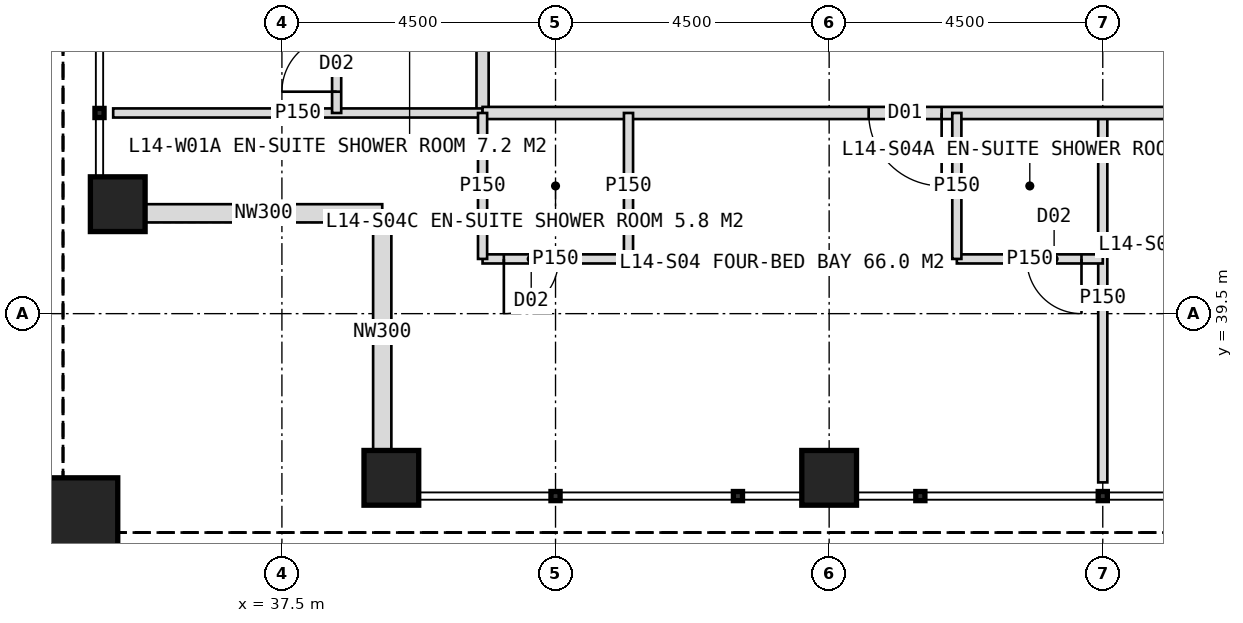
"""IFC4 building model, lengths in metres.
Left out: names, types, materials, properties, quantities, classifications, styles, units other than length and angle.
Written with IfcOpenShell. Run it as: python <this file> out.ifc"""

import sys

from ifc_helpers import new_model, si_unit, direction, frame, frame_2d, origin, origin_2d, place, context, subcontext, project, spatial, rectangle, hollow_rectangle, extrude, element, fill, save


model = new_model("IFC4")
c1 = context("Model", 3, precision=1e-05, world=origin(), true_north=direction((0.0, 1.0)))
c2 = subcontext(c1, "Body", "Model", "MODEL_VIEW")
j1 = project(units=[si_unit("LENGTHUNIT", "METRE"), si_unit("PLANEANGLEUNIT", "RADIAN")], contexts=[c1])
p1 = place(None, origin())
s1 = spatial("IfcSite", under=j1, at=p1, CompositionType="ELEMENT")
p2 = place(p1, origin())
s2 = spatial("IfcBuilding", under=s1, at=p2, CompositionType="ELEMENT")
p3 = place(p2, frame((0.0, 0.0, 63.0)))
s3 = spatial("IfcBuildingStorey", under=s2, at=p3, CompositionType="ELEMENT", Elevation=63.0)
for number, where, z_axis, x_axis in (
    (1, (39.3, 36.8, 0.0), (0.0, 0.0, 1.0), (1.0, 0.0, 0.0)),
    (2, (34.8, 41.3, 0.0), (0.0, 0.0, 1.0), (1.0, 0.0, 0.0)),
    (3, (46.5, 36.8, 0.0), (0.0, 0.0, 1.0), (1.0, 0.0, 0.0)),
):
    element("IfcColumn", number, at=place(p3, frame(where, z_axis=z_axis, x_axis=x_axis)), inside=s3, PredefinedType="COLUMN", context=c2, shape_type="SweptSolid", body=[
        extrude(hollow_rectangle(XDim=0.9, YDim=0.9, WallThickness=0.08, at=origin_2d()), origin(), (0.0, 0.0, 1.0), 4.0),
    ])
p4 = place(p3, frame((33.9, 35.9, 0.0), z_axis=(0.0, 0.0, 1.0), x_axis=(1.0, 0.0, 0.0)))
e4 = element("IfcColumn", 4, at=p4, inside=s3, PredefinedType="COLUMN", context=c2, shape_type="SweptSolid", body=[
    extrude(hollow_rectangle(XDim=1.8, YDim=1.8, WallThickness=0.1, at=origin_2d()), origin(), (0.0, 0.0, 1.0), 4.0),
])
for number, where, z_axis, x_axis in (
    (5, (39.15, 37.25, 0.0), (0.0, 0.0, 1.0), (0.0, 1.0, 0.0)),
    (6, (39.15, 41.15, 0.0), (0.0, 0.0, 1.0), (-1.0, 0.0, 0.0)),
):
    element("IfcWall", number, at=place(p3, frame(where, z_axis=z_axis, x_axis=x_axis)), inside=s3, PredefinedType="ELEMENTEDWALL", context=c2, shape_type="SweptSolid", body=[
        extrude(rectangle(XDim=3.9, YDim=0.3, at=frame_2d((1.95, 0.0))), origin(), (0.0, 0.0, 1.0), 2.95),
    ])
p5 = place(p3, frame((40.8, 42.8, 0.0), z_axis=(0.0, 0.0, 1.0), x_axis=(0.0, 1.0, 0.0)))
e7 = element("IfcWall", 7, at=p5, inside=s3, PredefinedType="PARTITIONING", context=c2, shape_type="SweptSolid", body=[
    extrude(rectangle(XDim=38.4, YDim=0.2, at=frame_2d((19.2, 0.0))), origin(), (0.0, 0.0, 1.0), 3.75),
])
p6 = place(p5, frame((3.25, 0.0, 0.0)))
e8 = element("IfcOpeningElement", 8, at=p6, cuts=e7, PredefinedType="OPENING", context=c2, shape_type="SweptSolid", body=[
    extrude(rectangle(XDim=1.2, YDim=2.2, at=frame_2d((0.6, 1.1))), frame((0.0, 0.11, 0.0), z_axis=(0.0, -1.0, 0.0), x_axis=(1.0, 0.0, 0.0)), (0.0, 0.0, 1.0), 0.22),
])
p7 = place(p5, frame((9.85, 0.0, 0.0)))
e9 = element("IfcOpeningElement", 9, at=p7, cuts=e7, PredefinedType="OPENING", context=c2, shape_type="SweptSolid", body=[
    extrude(rectangle(XDim=1.2, YDim=2.2, at=frame_2d((0.6, 1.1))), frame((0.0, 0.11, 0.0), z_axis=(0.0, -1.0, 0.0), x_axis=(1.0, 0.0, 0.0)), (0.0, 0.0, 1.0), 0.22),
])
p8 = place(p5, frame((15.85, 0.0, 0.0)))
e10 = element("IfcOpeningElement", 10, at=p8, cuts=e7, PredefinedType="OPENING", context=c2, shape_type="SweptSolid", body=[
    extrude(rectangle(XDim=1.2, YDim=2.2, at=frame_2d((0.6, 1.1))), frame((0.0, 0.11, 0.0), z_axis=(0.0, -1.0, 0.0), x_axis=(1.0, 0.0, 0.0)), (0.0, 0.0, 1.0), 0.22),
])
p9 = place(p5, frame((22.45, 0.0, 0.0)))
e11 = element("IfcOpeningElement", 11, at=p9, cuts=e7, PredefinedType="OPENING", context=c2, shape_type="SweptSolid", body=[
    extrude(rectangle(XDim=1.2, YDim=2.2, at=frame_2d((0.6, 1.1))), frame((0.0, 0.11, 0.0), z_axis=(0.0, -1.0, 0.0), x_axis=(1.0, 0.0, 0.0)), (0.0, 0.0, 1.0), 0.22),
])
p10 = place(p5, frame((30.85, 0.0, 0.0)))
e12 = element("IfcOpeningElement", 12, at=p10, cuts=e7, PredefinedType="OPENING", context=c2, shape_type="SweptSolid", body=[
    extrude(rectangle(XDim=1.2, YDim=2.2, at=frame_2d((0.6, 1.1))), frame((0.0, 0.11, 0.0), z_axis=(0.0, -1.0, 0.0), x_axis=(1.0, 0.0, 0.0)), (0.0, 0.0, 1.0), 0.22),
])
p11 = place(p3, frame((40.8, 42.8, 0.0), z_axis=(0.0, 0.0, 1.0), x_axis=(-1.0, 0.0, 0.0)))
e13 = element("IfcWall", 13, at=p11, inside=s3, PredefinedType="PARTITIONING", context=c2, shape_type="SweptSolid", body=[
    extrude(rectangle(XDim=6.075, YDim=0.15, at=frame_2d((3.038, 0.0))), origin(), (0.0, 0.0, 1.0), 3.75),
])
p12 = place(p3, frame((38.4, 42.8, 0.0), z_axis=(0.0, 0.0, 1.0), x_axis=(0.0, 1.0, 0.0)))
e14 = element("IfcWall", 14, at=p12, inside=s3, PredefinedType="PARTITIONING", context=c2, shape_type="SweptSolid", body=[
    extrude(rectangle(XDim=3.0, YDim=0.15, at=frame_2d((1.5, 0.0))), origin(), (0.0, 0.0, 1.0), 3.75),
])
p13 = place(p12, frame((0.35, 0.0, 0.0)))
e15 = element("IfcOpeningElement", 15, at=p13, cuts=e14, PredefinedType="OPENING", context=c2, shape_type="SweptSolid", body=[
    extrude(rectangle(XDim=0.9, YDim=2.1, at=frame_2d((0.45, 1.05))), frame((0.0, 0.085, 0.0), z_axis=(0.0, -1.0, 0.0), x_axis=(1.0, 0.0, 0.0)), (0.0, 0.0, 1.0), 0.17),
])
p14 = place(p3, frame((51.0, 42.8, 0.0), z_axis=(0.0, 0.0, 1.0), x_axis=(0.0, -1.0, 0.0)))
e16 = element("IfcWall", 16, at=p14, inside=s3, PredefinedType="PARTITIONING", context=c2, shape_type="SweptSolid", body=[
    extrude(rectangle(XDim=6.075, YDim=0.15, at=frame_2d((3.038, 0.0))), origin(), (0.0, 0.0, 1.0), 3.75),
])
p15 = place(p3, frame((79.2, 42.8, 0.0), z_axis=(0.0, 0.0, 1.0), x_axis=(-1.0, 0.0, 0.0)))
e17 = element("IfcWall", 17, at=p15, inside=s3, PredefinedType="PARTITIONING", context=c2, shape_type="SweptSolid", body=[
    extrude(rectangle(XDim=38.4, YDim=0.2, at=frame_2d((19.2, 0.0))), origin(), (0.0, 0.0, 1.0), 3.75),
])
p16 = place(p15, frame((3.25, 0.0, 0.0)))
e18 = element("IfcOpeningElement", 18, at=p16, cuts=e17, PredefinedType="OPENING", context=c2, shape_type="SweptSolid", body=[
    extrude(rectangle(XDim=1.2, YDim=2.2, at=frame_2d((0.6, 1.1))), frame((0.0, 0.11, 0.0), z_axis=(0.0, -1.0, 0.0), x_axis=(1.0, 0.0, 0.0)), (0.0, 0.0, 1.0), 0.22),
])
p17 = place(p15, frame((13.45, 0.0, 0.0)))
e19 = element("IfcOpeningElement", 19, at=p17, cuts=e17, PredefinedType="OPENING", context=c2, shape_type="SweptSolid", body=[
    extrude(rectangle(XDim=1.2, YDim=2.2, at=frame_2d((0.6, 1.1))), frame((0.0, 0.11, 0.0), z_axis=(0.0, -1.0, 0.0), x_axis=(1.0, 0.0, 0.0)), (0.0, 0.0, 1.0), 0.22),
])
p18 = place(p15, frame((22.45, 0.0, 0.0)))
e20 = element("IfcOpeningElement", 20, at=p18, cuts=e17, PredefinedType="OPENING", context=c2, shape_type="SweptSolid", body=[
    extrude(rectangle(XDim=1.2, YDim=2.2, at=frame_2d((0.6, 1.1))), frame((0.0, 0.11, 0.0), z_axis=(0.0, -1.0, 0.0), x_axis=(1.0, 0.0, 0.0)), (0.0, 0.0, 1.0), 0.22),
])
p19 = place(p15, frame((30.85, 0.0, 0.0)))
e21 = element("IfcOpeningElement", 21, at=p19, cuts=e17, PredefinedType="OPENING", context=c2, shape_type="SweptSolid", body=[
    extrude(rectangle(XDim=1.2, YDim=2.2, at=frame_2d((0.6, 1.1))), frame((0.0, 0.11, 0.0), z_axis=(0.0, -1.0, 0.0), x_axis=(1.0, 0.0, 0.0)), (0.0, 0.0, 1.0), 0.22),
])
p20 = place(p3, frame((51.0, 40.4, 0.0), z_axis=(0.0, 0.0, 1.0), x_axis=(-1.0, 0.0, 0.0)))
e22 = element("IfcWall", 22, at=p20, inside=s3, PredefinedType="PARTITIONING", context=c2, shape_type="SweptSolid", body=[
    extrude(rectangle(XDim=2.4, YDim=0.15, at=frame_2d((1.2, 0.0))), origin(), (0.0, 0.0, 1.0), 3.75),
])
p21 = place(p20, frame((0.35, 0.0, 0.0)))
e23 = element("IfcOpeningElement", 23, at=p21, cuts=e22, PredefinedType="OPENING", context=c2, shape_type="SweptSolid", body=[
    extrude(rectangle(XDim=0.9, YDim=2.1, at=frame_2d((0.45, 1.05))), frame((0.0, 0.085, 0.0), z_axis=(0.0, -1.0, 0.0), x_axis=(1.0, 0.0, 0.0)), (0.0, 0.0, 1.0), 0.17),
])
p22 = place(p3, frame((48.6, 42.8, 0.0), z_axis=(0.0, 0.0, 1.0), x_axis=(0.0, -1.0, 0.0)))
e24 = element("IfcWall", 24, at=p22, inside=s3, PredefinedType="PARTITIONING", context=c2, shape_type="SweptSolid", body=[
    extrude(rectangle(XDim=2.4, YDim=0.15, at=frame_2d((1.2, 0.0))), origin(), (0.0, 0.0, 1.0), 3.75),
])
p23 = place(p3, frame((43.2, 40.4, 0.0), z_axis=(0.0, 0.0, 1.0), x_axis=(-1.0, 0.0, 0.0)))
e25 = element("IfcWall", 25, at=p23, inside=s3, PredefinedType="PARTITIONING", context=c2, shape_type="SweptSolid", body=[
    extrude(rectangle(XDim=2.4, YDim=0.15, at=frame_2d((1.2, 0.0))), origin(), (0.0, 0.0, 1.0), 3.75),
])
p24 = place(p23, frame((1.15, 0.0, 0.0)))
e26 = element("IfcOpeningElement", 26, at=p24, cuts=e25, PredefinedType="OPENING", context=c2, shape_type="SweptSolid", body=[
    extrude(rectangle(XDim=0.9, YDim=2.1, at=frame_2d((0.45, 1.05))), frame((0.0, 0.085, 0.0), z_axis=(0.0, -1.0, 0.0), x_axis=(1.0, 0.0, 0.0)), (0.0, 0.0, 1.0), 0.17),
])
for number, where, z_axis, x_axis in (
    (27, (43.2, 42.8, 0.0), (0.0, 0.0, 1.0), (0.0, -1.0, 0.0)),
    (28, (40.8, 42.8, 0.0), (0.0, 0.0, 1.0), (0.0, -1.0, 0.0)),
):
    element("IfcWall", number, at=place(p3, frame(where, z_axis=z_axis, x_axis=x_axis)), inside=s3, PredefinedType="PARTITIONING", context=c2, shape_type="SweptSolid", body=[
        extrude(rectangle(XDim=2.4, YDim=0.15, at=frame_2d((1.2, 0.0))), origin(), (0.0, 0.0, 1.0), 3.75),
    ])
p25 = place(p13, origin())
e29 = element("IfcDoor", 29, at=p25, inside=s3, OperationType="SINGLE_SWING_LEFT", PredefinedType="DOOR", context=c2, shape_type="SweptSolid", body=[
    extrude(rectangle(XDim=0.9, YDim=2.1, at=frame_2d((0.45, 1.05))), frame((0.0, 0.025, 0.0), z_axis=(0.0, -1.0, 0.0), x_axis=(1.0, 0.0, 0.0)), (0.0, 0.0, 1.0), 0.05),
])
fill(e15, e29)
p26 = place(p19, origin())
e30 = element("IfcDoor", 30, at=p26, inside=s3, OperationType="SINGLE_SWING_LEFT", PredefinedType="DOOR", context=c2, shape_type="SweptSolid", body=[
    extrude(rectangle(XDim=1.2, YDim=2.2, at=frame_2d((0.6, 1.1))), frame((0.0, 0.025, 0.0), z_axis=(0.0, -1.0, 0.0), x_axis=(1.0, 0.0, 0.0)), (0.0, 0.0, 1.0), 0.05),
])
fill(e21, e30)
p27 = place(p21, origin())
e31 = element("IfcDoor", 31, at=p27, inside=s3, OperationType="SINGLE_SWING_LEFT", PredefinedType="DOOR", context=c2, shape_type="SweptSolid", body=[
    extrude(rectangle(XDim=0.9, YDim=2.1, at=frame_2d((0.45, 1.05))), frame((0.0, 0.025, 0.0), z_axis=(0.0, -1.0, 0.0), x_axis=(1.0, 0.0, 0.0)), (0.0, 0.0, 1.0), 0.05),
])
fill(e23, e31)
p28 = place(p24, origin())
e32 = element("IfcDoor", 32, at=p28, inside=s3, OperationType="SINGLE_SWING_RIGHT", PredefinedType="DOOR", context=c2, shape_type="SweptSolid", body=[
    extrude(rectangle(XDim=0.9, YDim=2.1, at=frame_2d((0.45, 1.05))), frame((0.0, 0.025, 0.0), z_axis=(0.0, -1.0, 0.0), x_axis=(1.0, 0.0, 0.0)), (0.0, 0.0, 1.0), 0.05),
])
fill(e26, e32)
save(model, sys.argv[1])
